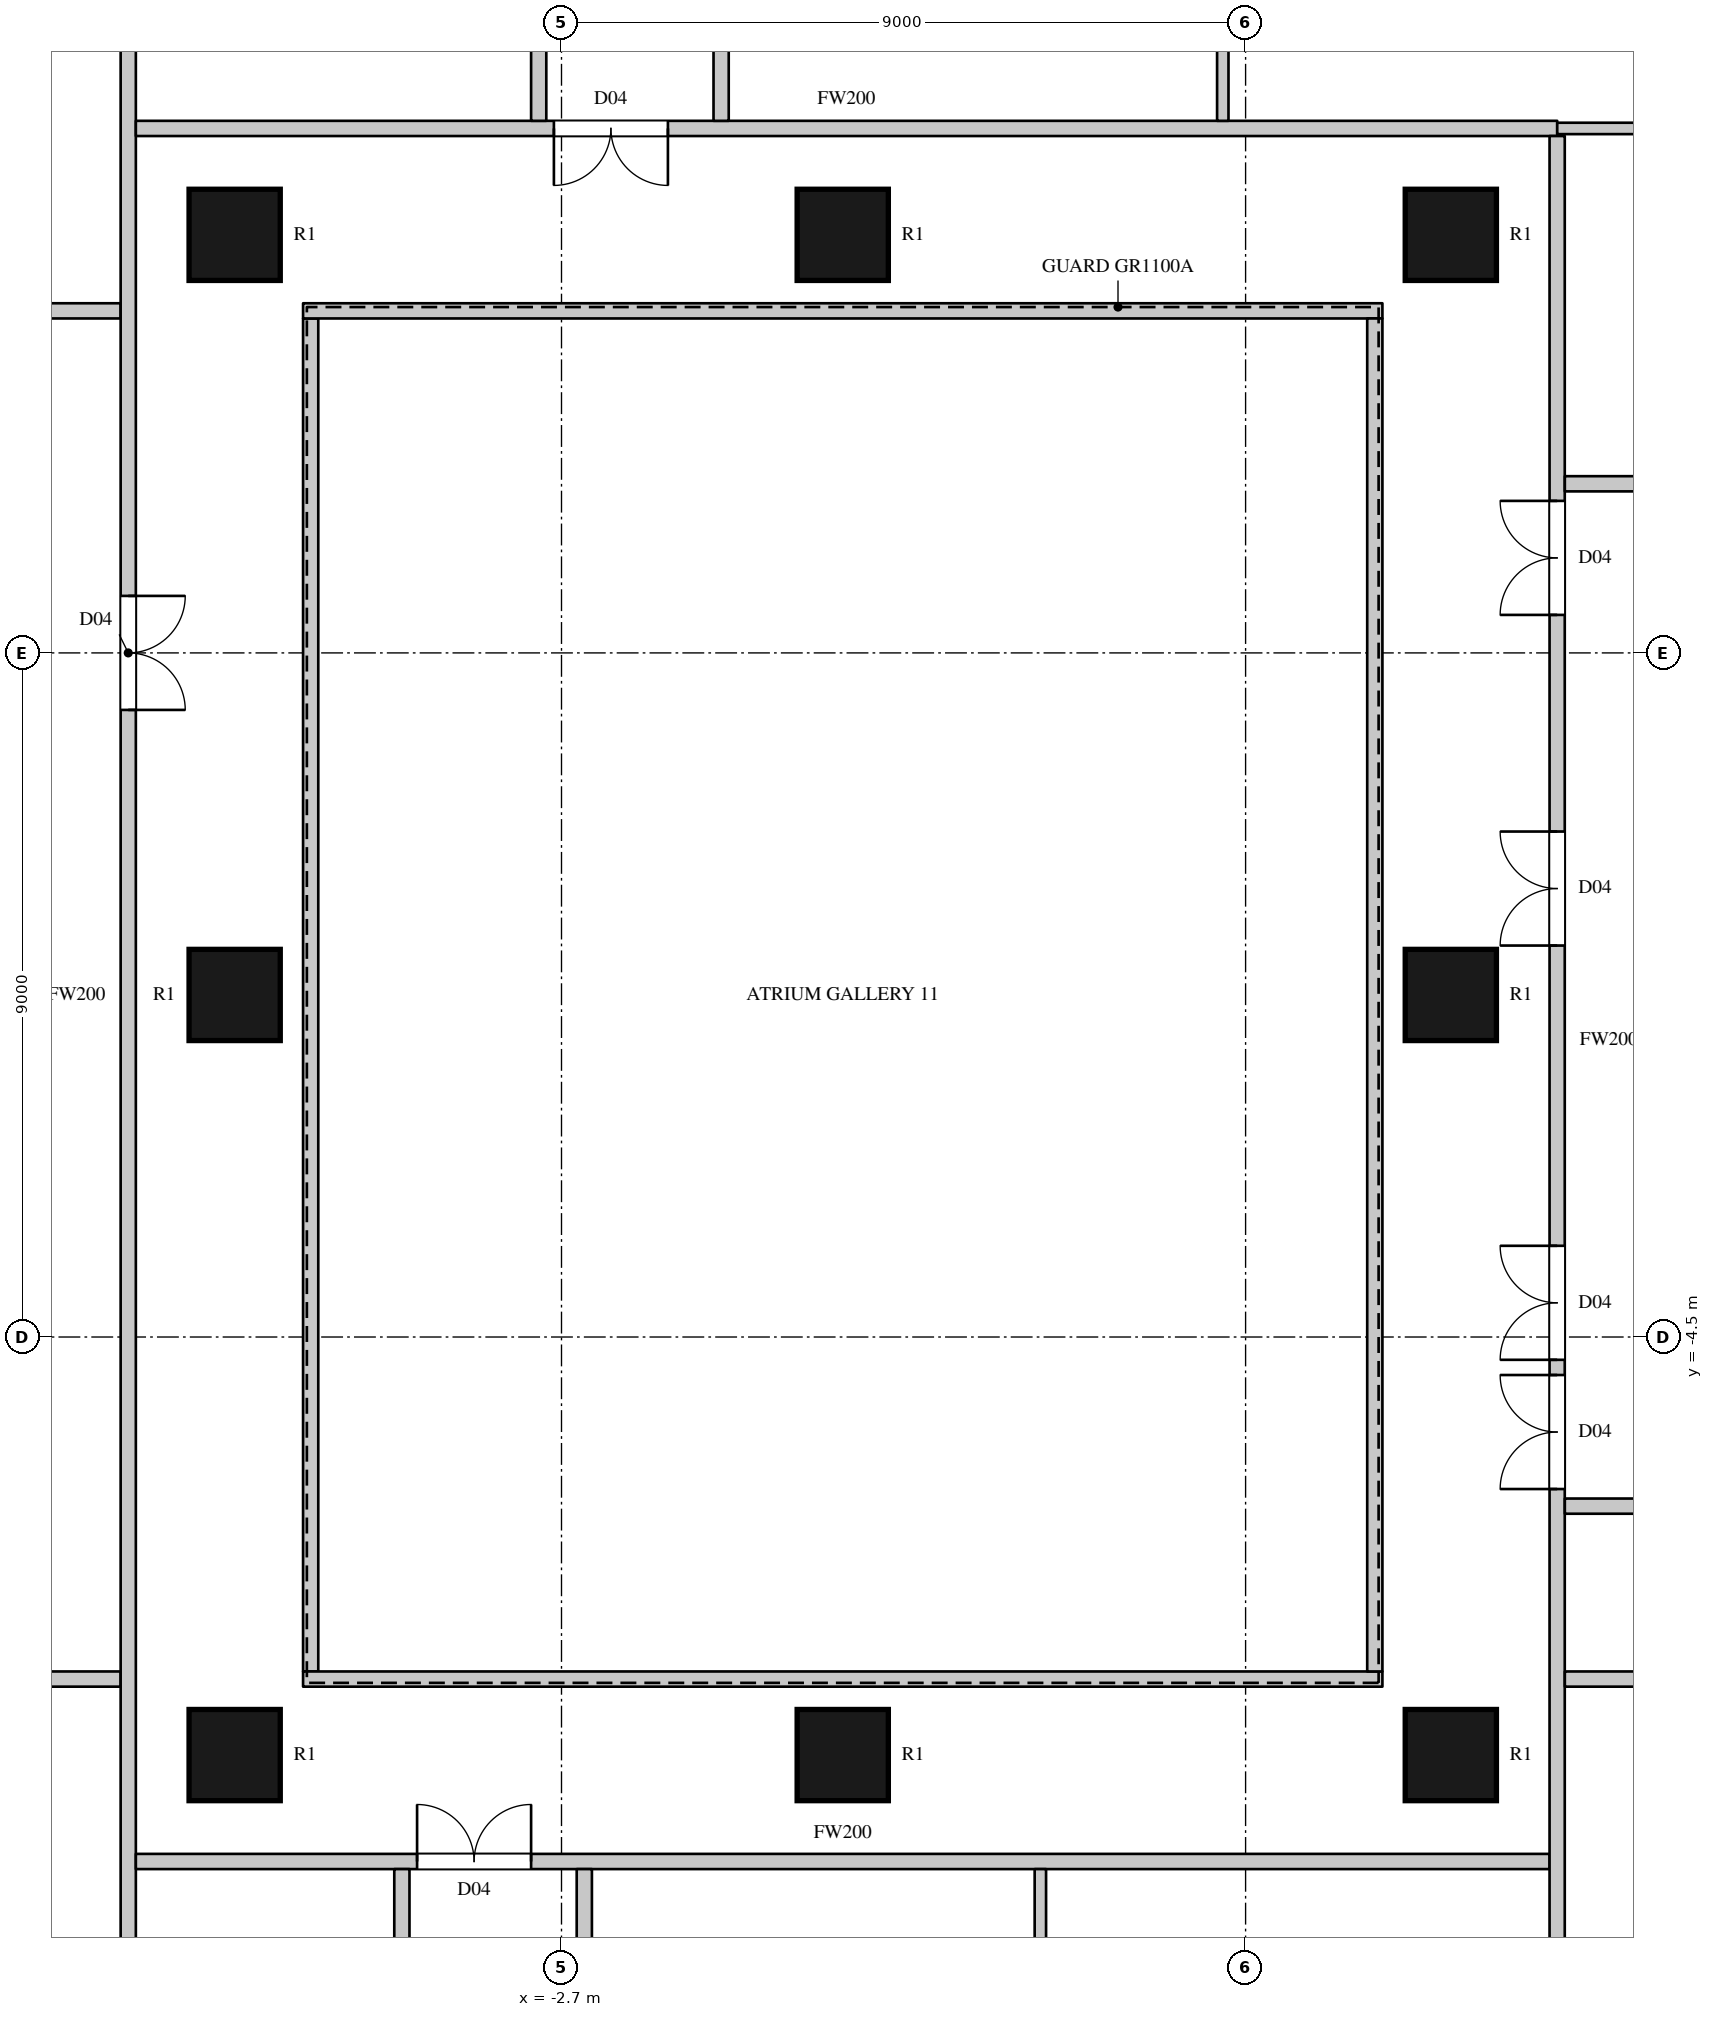
"""IFC4 building model, lengths in metres.
Left out: names, types, materials, properties, quantities, classifications, styles, units other than length and angle.
Written with IfcOpenShell. Run it as: python <this file> out.ifc"""

import sys

from ifc_helpers import new_model, si_unit, direction, frame, frame_2d, origin, origin_2d, place, context, subcontext, project, spatial, rectangle, circle, extrude, element, fill, save


model = new_model("IFC4")
c1 = context("Model", 3, precision=1e-05, world=origin(), true_north=direction((0.0, 1.0)))
c2 = subcontext(c1, "Body", "Model", "MODEL_VIEW")
j1 = project(units=[si_unit("LENGTHUNIT", "METRE"), si_unit("PLANEANGLEUNIT", "RADIAN")], contexts=[c1])
p1 = place(None, origin())
s1 = spatial("IfcSite", under=j1, at=p1, CompositionType="ELEMENT")
p2 = place(p1, origin())
s2 = spatial("IfcBuilding", under=s1, at=p2, CompositionType="ELEMENT")
p3 = place(p2, frame((0.0, 0.0, 69.9)))
s3 = spatial("IfcBuildingStorey", under=s2, at=p3, CompositionType="ELEMENT", Elevation=69.9)
for number, where, z_axis, x_axis in (
    (1, (-7.0, -10.0, 0.0), (0.0, 0.0, 1.0), (1.0, 0.0, 0.0)),
    (2, (-7.0, 0.0, 0.0), (0.0, 0.0, 1.0), (1.0, 0.0, 0.0)),
    (3, (-7.0, 10.0, 0.0), (0.0, 0.0, 1.0), (1.0, 0.0, 0.0)),
    (4, (1.0, -10.0, 0.0), (0.0, 0.0, 1.0), (1.0, 0.0, 0.0)),
    (5, (1.0, 10.0, 0.0), (0.0, 0.0, 1.0), (1.0, 0.0, 0.0)),
    (6, (9.0, -10.0, 0.0), (0.0, 0.0, 1.0), (1.0, 0.0, 0.0)),
    (7, (9.0, 0.0, 0.0), (0.0, 0.0, 1.0), (1.0, 0.0, 0.0)),
    (8, (9.0, 10.0, 0.0), (0.0, 0.0, 1.0), (1.0, 0.0, 0.0)),
):
    element("IfcColumn", number, at=place(p3, frame(where, z_axis=z_axis, x_axis=x_axis)), inside=s3, PredefinedType="COLUMN", context=c2, shape_type="SweptSolid", body=[
        extrude(circle(Radius=0.6, at=origin_2d()), origin(), (0.0, 0.0, 1.0), 3.6),
    ])
p4 = place(p3, frame((-13.97, -9.0, 0.0), z_axis=(0.0, 0.0, 1.0), x_axis=(1.0, 0.0, 0.0)))
e9 = element("IfcWall", 9, at=p4, inside=s3, PredefinedType="PARTITIONING", context=c2, shape_type="SweptSolid", body=[
    extrude(rectangle(XDim=5.47, YDim=0.2, at=frame_2d((2.735, 0.0))), origin(), (0.0, 0.0, 1.0), 3.3),
])
p5 = place(p4, frame((0.4, 0.0, 0.0)))
e10 = element("IfcOpeningElement", 10, at=p5, cuts=e9, PredefinedType="OPENING", context=c2, shape_type="SweptSolid", body=[
    extrude(rectangle(XDim=1.5, YDim=2.2, at=frame_2d((0.75, 1.1))), frame((0.0, 0.11, 0.0), z_axis=(0.0, -1.0, 0.0), x_axis=(1.0, 0.0, 0.0)), (0.0, 0.0, 1.0), 0.22),
])
p6 = place(p4, frame((2.05, 0.0, 0.0)))
e11 = element("IfcOpeningElement", 11, at=p6, cuts=e9, PredefinedType="OPENING", context=c2, shape_type="SweptSolid", body=[
    extrude(rectangle(XDim=1.5, YDim=2.2, at=frame_2d((0.75, 1.1))), frame((0.0, 0.11, 0.0), z_axis=(0.0, -1.0, 0.0), x_axis=(1.0, 0.0, 0.0)), (0.0, 0.0, 1.0), 0.22),
])
p7 = place(p3, frame((-13.97, 9.0, 0.0), z_axis=(0.0, 0.0, 1.0), x_axis=(1.0, 0.0, 0.0)))
e12 = element("IfcWall", 12, at=p7, inside=s3, PredefinedType="PARTITIONING", context=c2, shape_type="SweptSolid", body=[
    extrude(rectangle(XDim=5.47, YDim=0.2, at=frame_2d((2.735, 0.0))), origin(), (0.0, 0.0, 1.0), 3.3),
])
p8 = place(p3, frame((-8.4, -17.4, 0.0), z_axis=(0.0, 0.0, 1.0), x_axis=(0.0, 1.0, 0.0)))
e13 = element("IfcWall", 13, at=p8, inside=s3, PredefinedType="PARTITIONING", context=c2, shape_type="SweptSolid", body=[
    extrude(rectangle(XDim=34.8, YDim=0.2, at=frame_2d((17.4, 0.0))), origin(), (0.0, 0.0, 1.0), 3.3),
])
p9 = place(p8, frame((21.15, 0.0, 0.0)))
e14 = element("IfcOpeningElement", 14, at=p9, cuts=e13, PredefinedType="OPENING", context=c2, shape_type="SweptSolid", body=[
    extrude(rectangle(XDim=1.5, YDim=2.2, at=frame_2d((0.75, 1.1))), frame((0.0, 0.11, 0.0), z_axis=(0.0, -1.0, 0.0), x_axis=(1.0, 0.0, 0.0)), (0.0, 0.0, 1.0), 0.22),
])
p10 = place(p8, frame((33.75, 0.0, 0.0)))
e15 = element("IfcOpeningElement", 15, at=p10, cuts=e13, PredefinedType="OPENING", context=c2, shape_type="SweptSolid", body=[
    extrude(rectangle(XDim=0.9, YDim=2.2, at=frame_2d((0.45, 1.1))), frame((0.0, 0.11, 0.0), z_axis=(0.0, -1.0, 0.0), x_axis=(1.0, 0.0, 0.0)), (0.0, 0.0, 1.0), 0.22),
])
p11 = place(p8, frame((0.15, 0.0, 0.0)))
e16 = element("IfcOpeningElement", 16, at=p11, cuts=e13, PredefinedType="OPENING", context=c2, shape_type="SweptSolid", body=[
    extrude(rectangle(XDim=0.95, YDim=2.2, at=frame_2d((0.475, 1.1))), frame((0.0, 0.11, 0.0), z_axis=(0.0, -1.0, 0.0), x_axis=(1.0, 0.0, 0.0)), (0.0, 0.0, 1.0), 0.22),
])
p12 = place(p3, frame((-8.3, -11.4, 0.0), z_axis=(0.0, 0.0, 1.0), x_axis=(1.0, 0.0, 0.0)))
e17 = element("IfcWall", 17, at=p12, inside=s3, PredefinedType="PARTITIONING", context=c2, shape_type="SweptSolid", body=[
    extrude(rectangle(XDim=18.6, YDim=0.2, at=frame_2d((9.3, 0.0))), origin(), (0.0, 0.0, 1.0), 3.3),
])
p13 = place(p12, frame((3.7, 0.0, 0.0)))
e18 = element("IfcOpeningElement", 18, at=p13, cuts=e17, PredefinedType="OPENING", context=c2, shape_type="SweptSolid", body=[
    extrude(rectangle(XDim=1.5, YDim=2.2, at=frame_2d((0.75, 1.1))), frame((0.0, 0.11, 0.0), z_axis=(0.0, -1.0, 0.0), x_axis=(1.0, 0.0, 0.0)), (0.0, 0.0, 1.0), 0.22),
])
p14 = place(p3, frame((-8.3, 11.4, 0.0), z_axis=(0.0, 0.0, 1.0), x_axis=(1.0, 0.0, 0.0)))
e19 = element("IfcWall", 19, at=p14, inside=s3, PredefinedType="PARTITIONING", context=c2, shape_type="SweptSolid", body=[
    extrude(rectangle(XDim=18.7, YDim=0.2, at=frame_2d((9.35, 0.0))), origin(), (0.0, 0.0, 1.0), 3.3),
])
p15 = place(p14, frame((5.5, 0.0, 0.0)))
e20 = element("IfcOpeningElement", 20, at=p15, cuts=e19, PredefinedType="OPENING", context=c2, shape_type="SweptSolid", body=[
    extrude(rectangle(XDim=1.5, YDim=2.2, at=frame_2d((0.75, 1.1))), frame((0.0, 0.11, 0.0), z_axis=(0.0, -1.0, 0.0), x_axis=(1.0, 0.0, 0.0)), (0.0, 0.0, 1.0), 0.22),
])
p16 = place(p3, frame((-6.0, -8.9, 0.0), z_axis=(0.0, 0.0, 1.0), x_axis=(0.0, 1.0, 0.0)))
e21 = element("IfcWall", 21, at=p16, inside=s3, PredefinedType="PARTITIONING", context=c2, shape_type="SweptSolid", body=[
    extrude(rectangle(XDim=17.8, YDim=0.2, at=frame_2d((8.9, 0.0))), origin(), (0.0, 0.0, 1.0), 3.3),
])
for number, where, z_axis, x_axis in (
    (22, (-6.1, -9.0, 0.0), (0.0, 0.0, 1.0), (1.0, 0.0, 0.0)),
    (23, (-6.1, 9.0, 0.0), (0.0, 0.0, 1.0), (1.0, 0.0, 0.0)),
):
    element("IfcWall", number, at=place(p3, frame(where, z_axis=z_axis, x_axis=x_axis)), inside=s3, PredefinedType="PARTITIONING", context=c2, shape_type="SweptSolid", body=[
        extrude(rectangle(XDim=14.2, YDim=0.2, at=frame_2d((7.1, 0.0))), origin(), (0.0, 0.0, 1.0), 3.3),
    ])
p17 = place(p3, frame((-4.8, -17.4, 0.0), z_axis=(0.0, 0.0, 1.0), x_axis=(0.0, 1.0, 0.0)))
e24 = element("IfcWall", 24, at=p17, inside=s3, PredefinedType="PARTITIONING", context=c2, shape_type="SweptSolid", body=[
    extrude(rectangle(XDim=5.9, YDim=0.2, at=frame_2d((2.95, 0.0))), origin(), (0.0, 0.0, 1.0), 3.3),
])
p18 = place(p3, frame((-3.0, 11.5, 0.0), z_axis=(0.0, 0.0, 1.0), x_axis=(0.0, 1.0, 0.0)))
e25 = element("IfcWall", 25, at=p18, inside=s3, PredefinedType="PARTITIONING", context=c2, shape_type="SweptSolid", body=[
    extrude(rectangle(XDim=5.443, YDim=0.2, at=frame_2d((2.722, 0.0))), origin(), (0.0, 0.0, 1.0), 3.3),
])
p19 = place(p3, frame((-2.4, -16.943, 0.0), z_axis=(0.0, 0.0, 1.0), x_axis=(0.0, 1.0, 0.0)))
e26 = element("IfcWall", 26, at=p19, inside=s3, PredefinedType="PARTITIONING", context=c2, shape_type="SweptSolid", body=[
    extrude(rectangle(XDim=5.443, YDim=0.2, at=frame_2d((2.722, 0.0))), origin(), (0.0, 0.0, 1.0), 3.3),
])
p20 = place(p19, frame((0.3, 0.0, 0.0)))
e27 = element("IfcOpeningElement", 27, at=p20, cuts=e26, PredefinedType="OPENING", context=c2, shape_type="SweptSolid", body=[
    extrude(rectangle(XDim=0.95, YDim=2.2, at=frame_2d((0.475, 1.1))), frame((0.0, 0.11, 0.0), z_axis=(0.0, -1.0, 0.0), x_axis=(1.0, 0.0, 0.0)), (0.0, 0.0, 1.0), 0.22),
])
p21 = place(p3, frame((-0.6, 11.5, 0.0), z_axis=(0.0, 0.0, 1.0), x_axis=(0.0, 1.0, 0.0)))
e28 = element("IfcWall", 28, at=p21, inside=s3, PredefinedType="PARTITIONING", context=c2, shape_type="SweptSolid", body=[
    extrude(rectangle(XDim=5.9, YDim=0.2, at=frame_2d((2.95, 0.0))), origin(), (0.0, 0.0, 1.0), 3.3),
])
p22 = place(p21, frame((4.15, 0.0, 0.0)))
e29 = element("IfcOpeningElement", 29, at=p22, cuts=e28, PredefinedType="OPENING", context=c2, shape_type="SweptSolid", body=[
    extrude(rectangle(XDim=1.6, YDim=2.4, at=frame_2d((0.8, 1.2))), frame((0.0, 0.11, 0.0), z_axis=(0.0, -1.0, 0.0), x_axis=(1.0, 0.0, 0.0)), (0.0, 0.0, 1.0), 0.22),
])
p23 = place(p3, frame((8.0, -8.9, 0.0), z_axis=(0.0, 0.0, 1.0), x_axis=(0.0, 1.0, 0.0)))
e30 = element("IfcWall", 30, at=p23, inside=s3, PredefinedType="PARTITIONING", context=c2, shape_type="SweptSolid", body=[
    extrude(rectangle(XDim=17.8, YDim=0.2, at=frame_2d((8.9, 0.0))), origin(), (0.0, 0.0, 1.0), 3.3),
])
p24 = place(p3, frame((10.399, -12.5, 0.0), z_axis=(0.0, 0.0, 1.0), x_axis=(0.0, 1.0, 0.0)))
e31 = element("IfcWall", 31, at=p24, inside=s3, PredefinedType="PARTITIONING", context=c2, shape_type="SweptSolid", body=[
    extrude(rectangle(XDim=23.8, YDim=0.2, at=frame_2d((11.9, 0.0))), origin(), (0.0, 0.0, 1.0), 3.3),
])
p25 = place(p24, frame((6.0, 0.0, 0.0)))
e32 = element("IfcOpeningElement", 32, at=p25, cuts=e31, PredefinedType="OPENING", context=c2, shape_type="SweptSolid", body=[
    extrude(rectangle(XDim=1.5, YDim=2.2, at=frame_2d((0.75, 1.1))), frame((0.0, 0.11, 0.0), z_axis=(0.0, -1.0, 0.0), x_axis=(1.0, 0.0, 0.0)), (0.0, 0.0, 1.0), 0.22),
])
p26 = place(p24, frame((17.5, 0.0, 0.0)))
e33 = element("IfcOpeningElement", 33, at=p26, cuts=e31, PredefinedType="OPENING", context=c2, shape_type="SweptSolid", body=[
    extrude(rectangle(XDim=1.5, YDim=2.2, at=frame_2d((0.75, 1.1))), frame((0.0, 0.11, 0.0), z_axis=(0.0, -1.0, 0.0), x_axis=(1.0, 0.0, 0.0)), (0.0, 0.0, 1.0), 0.22),
])
p27 = place(p24, frame((7.7, 0.0, 0.0)))
e34 = element("IfcOpeningElement", 34, at=p27, cuts=e31, PredefinedType="OPENING", context=c2, shape_type="SweptSolid", body=[
    extrude(rectangle(XDim=1.5, YDim=2.2, at=frame_2d((0.75, 1.1))), frame((0.0, 0.11, 0.0), z_axis=(0.0, -1.0, 0.0), x_axis=(1.0, 0.0, 0.0)), (0.0, 0.0, 1.0), 0.22),
])
p28 = place(p24, frame((13.15, 0.0, 0.0)))
e35 = element("IfcOpeningElement", 35, at=p28, cuts=e31, PredefinedType="OPENING", context=c2, shape_type="SweptSolid", body=[
    extrude(rectangle(XDim=1.5, YDim=2.2, at=frame_2d((0.75, 1.1))), frame((0.0, 0.11, 0.0), z_axis=(0.0, -1.0, 0.0), x_axis=(1.0, 0.0, 0.0)), (0.0, 0.0, 1.0), 0.22),
])
p29 = place(p3, frame((10.5, -9.0, 0.0), z_axis=(0.0, 0.0, 1.0), x_axis=(1.0, 0.0, 0.0)))
e36 = element("IfcWall", 36, at=p29, inside=s3, PredefinedType="PARTITIONING", context=c2, shape_type="SweptSolid", body=[
    extrude(rectangle(XDim=5.7, YDim=0.2, at=frame_2d((2.85, 0.0))), origin(), (0.0, 0.0, 1.0), 2.65),
])
p30 = place(p29, frame((4.45, 0.0, 0.0)))
e37 = element("IfcOpeningElement", 37, at=p30, cuts=e36, PredefinedType="OPENING", context=c2, shape_type="SweptSolid", body=[
    extrude(rectangle(XDim=0.95, YDim=2.2, at=frame_2d((0.475, 1.1))), frame((0.0, 0.11, 0.0), z_axis=(0.0, -1.0, 0.0), x_axis=(1.0, 0.0, 0.0)), (0.0, 0.0, 1.0), 0.22),
])
p31 = place(p3, frame((10.5, -6.725, 0.0), z_axis=(0.0, 0.0, 1.0), x_axis=(1.0, 0.0, 0.0)))
e38 = element("IfcWall", 38, at=p31, inside=s3, PredefinedType="PARTITIONING", context=c2, shape_type="SweptSolid", body=[
    extrude(rectangle(XDim=5.7, YDim=0.2, at=frame_2d((2.85, 0.0))), origin(), (0.0, 0.0, 1.0), 3.3),
])
p32 = place(p3, frame((10.5, 6.725, 0.0), z_axis=(0.0, 0.0, 1.0), x_axis=(1.0, 0.0, 0.0)))
e39 = element("IfcWall", 39, at=p32, inside=s3, PredefinedType="PARTITIONING", context=c2, shape_type="SweptSolid", body=[
    extrude(rectangle(XDim=5.7, YDim=0.2, at=frame_2d((2.85, 0.0))), origin(), (0.0, 0.0, 1.0), 3.3),
])
p33 = place(p32, frame((4.5, 0.0, 0.0)))
e40 = element("IfcOpeningElement", 40, at=p33, cuts=e39, PredefinedType="OPENING", context=c2, shape_type="SweptSolid", body=[
    extrude(rectangle(XDim=0.9, YDim=2.2, at=frame_2d((0.45, 1.1))), frame((0.0, 0.11, 0.0), z_axis=(0.0, -1.0, 0.0), x_axis=(1.0, 0.0, 0.0)), (0.0, 0.0, 1.0), 0.22),
])
p34 = place(p3, frame((3.6, -17.4, 0.0), z_axis=(0.0, 0.0, 1.0), x_axis=(0.0, 1.0, 0.0)))
e41 = element("IfcWall", 41, at=p34, inside=s3, PredefinedType="PARTITIONING", context=c2, shape_type="SweptSolid", body=[
    extrude(rectangle(XDim=5.9, YDim=0.15, at=frame_2d((2.95, 0.0))), origin(), (0.0, 0.0, 1.0), 3.3),
])
p35 = place(p3, frame((6.0, 11.5, 0.0), z_axis=(0.0, 0.0, 1.0), x_axis=(0.0, 1.0, 0.0)))
e42 = element("IfcWall", 42, at=p35, inside=s3, PredefinedType="PARTITIONING", context=c2, shape_type="SweptSolid", body=[
    extrude(rectangle(XDim=5.453, YDim=0.15, at=frame_2d((2.727, 0.0))), origin(), (0.0, 0.0, 1.0), 3.3),
])
p36 = place(p3, frame((10.4, 11.4, 0.0), z_axis=(0.0, 0.0, 1.0), x_axis=(1.0, 0.0, 0.0)))
e43 = element("IfcWall", 43, at=p36, inside=s3, PredefinedType="PARTITIONING", context=c2, shape_type="SweptSolid", body=[
    extrude(rectangle(XDim=5.6, YDim=0.15, at=frame_2d((2.8, 0.0))), origin(), (0.0, 0.0, 1.0), 3.3),
])
p37 = place(p9, origin())
e44 = element("IfcDoor", 44, at=p37, inside=s3, OperationType="DOUBLE_DOOR_SINGLE_SWING", PredefinedType="DOOR", context=c2, shape_type="SweptSolid", body=[
    extrude(rectangle(XDim=1.5, YDim=2.2, at=frame_2d((0.75, 1.1))), frame((0.0, 0.025, 0.0), z_axis=(0.0, -1.0, 0.0), x_axis=(1.0, 0.0, 0.0)), (0.0, 0.0, 1.0), 0.05),
])
fill(e14, e44)
p38 = place(p13, origin())
e45 = element("IfcDoor", 45, at=p38, inside=s3, OperationType="DOUBLE_DOOR_SINGLE_SWING", PredefinedType="DOOR", context=c2, shape_type="SweptSolid", body=[
    extrude(rectangle(XDim=1.5, YDim=2.2, at=frame_2d((0.75, 1.1))), frame((0.0, 0.025, 0.0), z_axis=(0.0, -1.0, 0.0), x_axis=(1.0, 0.0, 0.0)), (0.0, 0.0, 1.0), 0.05),
])
fill(e18, e45)
p39 = place(p15, origin())
e46 = element("IfcDoor", 46, at=p39, inside=s3, OperationType="DOUBLE_DOOR_SINGLE_SWING", PredefinedType="DOOR", context=c2, shape_type="SweptSolid", body=[
    extrude(rectangle(XDim=1.5, YDim=2.2, at=frame_2d((0.75, 1.1))), frame((0.0, 0.025, 0.0), z_axis=(0.0, -1.0, 0.0), x_axis=(1.0, 0.0, 0.0)), (0.0, 0.0, 1.0), 0.05),
])
fill(e20, e46)
p40 = place(p25, origin())
e47 = element("IfcDoor", 47, at=p40, inside=s3, OperationType="DOUBLE_DOOR_SINGLE_SWING", PredefinedType="DOOR", context=c2, shape_type="SweptSolid", body=[
    extrude(rectangle(XDim=1.5, YDim=2.2, at=frame_2d((0.75, 1.1))), frame((0.0, 0.025, 0.0), z_axis=(0.0, -1.0, 0.0), x_axis=(1.0, 0.0, 0.0)), (0.0, 0.0, 1.0), 0.05),
])
fill(e32, e47)
p41 = place(p26, origin())
e48 = element("IfcDoor", 48, at=p41, inside=s3, OperationType="DOUBLE_DOOR_SINGLE_SWING", PredefinedType="DOOR", context=c2, shape_type="SweptSolid", body=[
    extrude(rectangle(XDim=1.5, YDim=2.2, at=frame_2d((0.75, 1.1))), frame((0.0, 0.025, 0.0), z_axis=(0.0, -1.0, 0.0), x_axis=(1.0, 0.0, 0.0)), (0.0, 0.0, 1.0), 0.05),
])
fill(e33, e48)
p42 = place(p27, origin())
e49 = element("IfcDoor", 49, at=p42, inside=s3, OperationType="DOUBLE_DOOR_SINGLE_SWING", PredefinedType="DOOR", context=c2, shape_type="SweptSolid", body=[
    extrude(rectangle(XDim=1.5, YDim=2.2, at=frame_2d((0.75, 1.1))), frame((0.0, 0.025, 0.0), z_axis=(0.0, -1.0, 0.0), x_axis=(1.0, 0.0, 0.0)), (0.0, 0.0, 1.0), 0.05),
])
fill(e34, e49)
p43 = place(p28, origin())
e50 = element("IfcDoor", 50, at=p43, inside=s3, OperationType="DOUBLE_DOOR_SINGLE_SWING", PredefinedType="DOOR", context=c2, shape_type="SweptSolid", body=[
    extrude(rectangle(XDim=1.5, YDim=2.2, at=frame_2d((0.75, 1.1))), frame((0.0, 0.025, 0.0), z_axis=(0.0, -1.0, 0.0), x_axis=(1.0, 0.0, 0.0)), (0.0, 0.0, 1.0), 0.05),
])
fill(e35, e50)
save(model, sys.argv[1])
